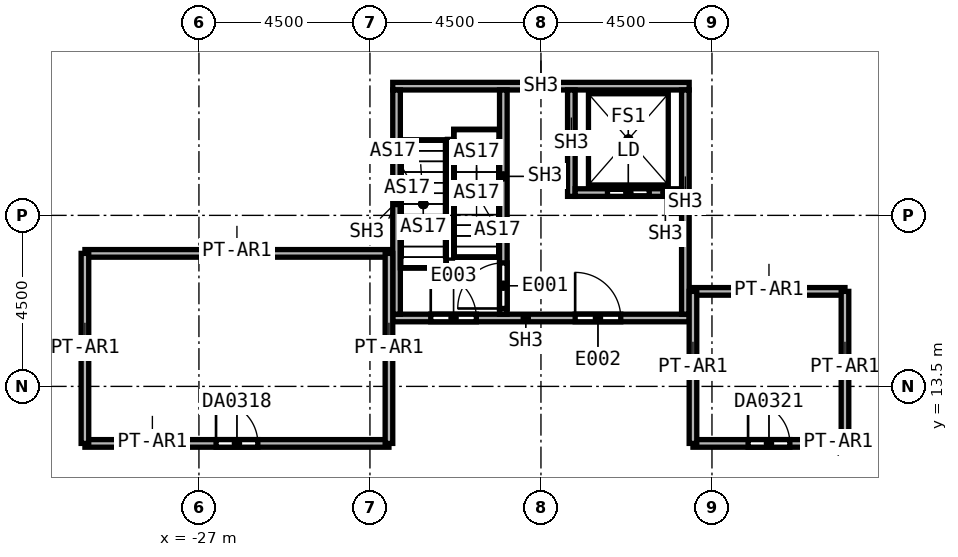
"""IFC4 building model, lengths in metres.
Left out: names, types, materials, properties, quantities, classifications, styles, units other than length and angle.
Written with IfcOpenShell. Run it as: python <this file> out.ifc"""

import sys

from ifc_helpers import new_model, si_unit, direction, frame, frame_2d, origin, place, context, subcontext, project, spatial, rectangle, extrude, element, fill, save


model = new_model("IFC4")
c1 = context("Model", 3, precision=1e-05, world=origin(), true_north=direction((0.0, 1.0)))
c2 = subcontext(c1, "Body", "Model", "MODEL_VIEW")
j1 = project(units=[si_unit("LENGTHUNIT", "METRE"), si_unit("PLANEANGLEUNIT", "RADIAN")], contexts=[c1])
p1 = place(None, origin())
s1 = spatial("IfcSite", under=j1, at=p1, CompositionType="ELEMENT")
p2 = place(p1, origin())
s2 = spatial("IfcBuilding", under=s1, at=p2, CompositionType="ELEMENT")
p3 = place(p2, origin())
s3 = spatial("IfcBuildingStorey", under=s2, at=p3, CompositionType="ELEMENT", Elevation=0.0)
p4 = place(p3, frame((-21.9, 15.3, 0.0), z_axis=(0.0, 0.0, 1.0), x_axis=(1.0, 0.0, 0.0)))
e1 = element("IfcWall", 1, at=p4, inside=s3, PredefinedType="SOLIDWALL", context=c2, shape_type="SweptSolid", body=[
    extrude(rectangle(XDim=7.8, YDim=0.2, at=frame_2d((3.9, 0.0))), origin(), (0.0, 0.0, 1.0), 11.7),
])
p5 = place(p4, frame((4.8, 0.0, 0.0)))
e2 = element("IfcOpeningElement", 2, at=p5, cuts=e1, PredefinedType="OPENING", context=c2, shape_type="SweptSolid", body=[
    extrude(rectangle(XDim=1.2, YDim=2.1, at=frame_2d((0.6, 1.05))), frame((0.0, 0.1, 0.0), z_axis=(0.0, -1.0, 0.0), x_axis=(1.0, 0.0, 0.0)), (0.0, 0.0, 1.0), 0.2),
])
p6 = place(p4, frame((1.0, 0.0, 0.0)))
e3 = element("IfcOpeningElement", 3, at=p6, cuts=e1, PredefinedType="OPENING", context=c2, shape_type="SweptSolid", body=[
    extrude(rectangle(XDim=1.2, YDim=2.1, at=frame_2d((0.6, 1.05))), frame((0.0, 0.1, 0.0), z_axis=(0.0, -1.0, 0.0), x_axis=(1.0, 0.0, 0.0)), (0.0, 0.0, 1.0), 0.2),
])
p7 = place(p3, frame((-21.9, 21.4, 0.0), z_axis=(0.0, 0.0, 1.0), x_axis=(1.0, 0.0, 0.0)))
e4 = element("IfcWall", 4, at=p7, inside=s3, PredefinedType="SOLIDWALL", context=c2, shape_type="SweptSolid", body=[
    extrude(rectangle(XDim=7.8, YDim=0.2, at=frame_2d((3.9, 0.0))), origin(), (0.0, 0.0, 1.0), 11.7),
])
for number, where, z_axis, x_axis in (
    (5, (-21.8, 15.4, 0.0), (0.0, 0.0, 1.0), (0.0, 1.0, 0.0)),
    (6, (-14.2, 15.4, 0.0), (0.0, 0.0, 1.0), (0.0, 1.0, 0.0)),
):
    element("IfcWall", number, at=place(p3, frame(where, z_axis=z_axis, x_axis=x_axis)), inside=s3, PredefinedType="SOLIDWALL", context=c2, shape_type="SweptSolid", body=[
        extrude(rectangle(XDim=5.9, YDim=0.2, at=frame_2d((2.95, 0.0))), origin(), (0.0, 0.0, 1.0), 11.7),
    ])
p8 = place(p3, frame((-18.99, 15.4, 0.0), z_axis=(0.0, 0.0, 1.0), x_axis=(0.0, 1.0, 0.0)))
e7 = element("IfcWall", 7, at=p8, inside=s3, PredefinedType="SOLIDWALL", context=c2, shape_type="SweptSolid", body=[
    extrude(rectangle(XDim=5.9, YDim=0.2, at=frame_2d((2.95, 0.0))), origin(), (0.0, 0.0, 1.0), 11.7),
])
p9 = place(p8, frame((0.15, 0.0, 0.0)))
e8 = element("IfcOpeningElement", 8, at=p9, cuts=e7, PredefinedType="OPENING", context=c2, shape_type="SweptSolid", body=[
    extrude(rectangle(XDim=1.2, YDim=2.1, at=frame_2d((0.6, 1.05))), frame((0.0, 0.1, 0.0), z_axis=(0.0, -1.0, 0.0), x_axis=(1.0, 0.0, 0.0)), (0.0, 0.0, 1.0), 0.2),
])
p10 = place(p3, frame((-17.2, 18.5, 0.0), z_axis=(0.0, 0.0, 1.0), x_axis=(0.0, 1.0, 0.0)))
e9 = element("IfcWall", 9, at=p10, inside=s3, PredefinedType="SOLIDWALL", context=c2, shape_type="SweptSolid", body=[
    extrude(rectangle(XDim=2.8, YDim=0.2, at=frame_2d((1.4, 0.0))), origin(), (0.0, 0.0, 1.0), 11.7),
])
p11 = place(p3, frame((-17.1, 18.6, 0.0), z_axis=(0.0, 0.0, 1.0), x_axis=(1.0, 0.0, 0.0)))
e10 = element("IfcWall", 10, at=p11, inside=s3, PredefinedType="SOLIDWALL", context=c2, shape_type="SweptSolid", body=[
    extrude(rectangle(XDim=2.8, YDim=0.2, at=frame_2d((1.4, 0.0))), origin(), (0.0, 0.0, 1.0), 11.7),
])
p12 = place(p11, frame((0.85, 0.0, 0.0)))
e11 = element("IfcOpeningElement", 11, at=p12, cuts=e10, PredefinedType="OPENING", context=c2, shape_type="SweptSolid", body=[
    extrude(rectangle(XDim=1.1, YDim=2.1, at=frame_2d((0.55, 1.05))), frame((0.0, 0.1, 0.0), z_axis=(0.0, -1.0, 0.0), x_axis=(1.0, 0.0, 0.0)), (0.0, 0.0, 1.0), 0.2),
])
p13 = place(p3, frame((-30.0, 12.0, 0.0), z_axis=(0.0, 0.0, 1.0), x_axis=(1.0, 0.0, 0.0)))
e12 = element("IfcWall", 12, at=p13, inside=s3, PredefinedType="PARTITIONING", context=c2, shape_type="SweptSolid", body=[
    extrude(rectangle(XDim=8.0, YDim=0.2, at=frame_2d((4.0, 0.0))), origin(), (0.0, 0.0, 1.0), 11.7),
])
p14 = place(p13, frame((3.45, 0.0, 0.0)))
e13 = element("IfcOpeningElement", 13, at=p14, cuts=e12, PredefinedType="OPENING", context=c2, shape_type="SweptSolid", body=[
    extrude(rectangle(XDim=1.1, YDim=2.4, at=frame_2d((0.55, 1.2))), frame((0.0, 0.1, 0.0), z_axis=(0.0, -1.0, 0.0), x_axis=(1.0, 0.0, 0.0)), (0.0, 0.0, 1.0), 0.2),
])
p15 = place(p3, frame((-22.0, 17.0, 0.0), z_axis=(0.0, 0.0, 1.0), x_axis=(-1.0, 0.0, 0.0)))
e14 = element("IfcWall", 14, at=p15, inside=s3, PredefinedType="PARTITIONING", context=c2, shape_type="SweptSolid", body=[
    extrude(rectangle(XDim=8.0, YDim=0.2, at=frame_2d((4.0, 0.0))), origin(), (0.0, 0.0, 1.0), 11.7),
])
for number, where, z_axis, x_axis in (
    (15, (-30.0, 17.0, 0.0), (0.0, 0.0, 1.0), (0.0, -1.0, 0.0)),
    (16, (-22.0, 12.0, 0.0), (0.0, 0.0, 1.0), (0.0, 1.0, 0.0)),
):
    element("IfcWall", number, at=place(p3, frame(where, z_axis=z_axis, x_axis=x_axis)), inside=s3, PredefinedType="PARTITIONING", context=c2, shape_type="SweptSolid", body=[
        extrude(rectangle(XDim=5.0, YDim=0.2, at=frame_2d((2.5, 0.0))), origin(), (0.0, 0.0, 1.0), 11.7),
    ])
p16 = place(p3, frame((-14.0, 12.0, 0.0), z_axis=(0.0, 0.0, 1.0), x_axis=(1.0, 0.0, 0.0)))
e17 = element("IfcWall", 17, at=p16, inside=s3, PredefinedType="PARTITIONING", context=c2, shape_type="SweptSolid", body=[
    extrude(rectangle(XDim=4.0, YDim=0.2, at=frame_2d((2.0, 0.0))), origin(), (0.0, 0.0, 1.0), 11.7),
])
p17 = place(p16, frame((1.45, 0.0, 0.0)))
e18 = element("IfcOpeningElement", 18, at=p17, cuts=e17, PredefinedType="OPENING", context=c2, shape_type="SweptSolid", body=[
    extrude(rectangle(XDim=1.1, YDim=2.4, at=frame_2d((0.55, 1.2))), frame((0.0, 0.1, 0.0), z_axis=(0.0, -1.0, 0.0), x_axis=(1.0, 0.0, 0.0)), (0.0, 0.0, 1.0), 0.2),
])
for number, where, z_axis, x_axis in (
    (19, (-10.0, 16.0, 0.0), (0.0, 0.0, 1.0), (-1.0, 0.0, 0.0)),
    (20, (-14.0, 16.0, 0.0), (0.0, 0.0, 1.0), (0.0, -1.0, 0.0)),
    (21, (-10.0, 12.0, 0.0), (0.0, 0.0, 1.0), (0.0, 1.0, 0.0)),
):
    element("IfcWall", number, at=place(p3, frame(where, z_axis=z_axis, x_axis=x_axis)), inside=s3, PredefinedType="PARTITIONING", context=c2, shape_type="SweptSolid", body=[
        extrude(rectangle(XDim=4.0, YDim=0.2, at=frame_2d((2.0, 0.0))), origin(), (0.0, 0.0, 1.0), 11.7),
    ])
p18 = place(p9, origin())
e22 = element("IfcDoor", 22, at=p18, inside=s3, OperationType="SINGLE_SWING_LEFT", PredefinedType="DOOR", context=c2, shape_type="SweptSolid", body=[
    extrude(rectangle(XDim=1.2, YDim=2.1, at=frame_2d((0.6, 1.05))), frame((0.0, 0.025, 0.0), z_axis=(0.0, -1.0, 0.0), x_axis=(1.0, 0.0, 0.0)), (0.0, 0.0, 1.0), 0.05),
])
fill(e8, e22)
p19 = place(p12, origin())
e23 = element("IfcDoor", 23, at=p19, inside=s3, OperationType="SLIDING_TO_LEFT", PredefinedType="DOOR", context=c2, shape_type="SweptSolid", body=[
    extrude(rectangle(XDim=1.1, YDim=2.1, at=frame_2d((0.55, 1.05))), frame((0.0, 0.025, 0.0), z_axis=(0.0, -1.0, 0.0), x_axis=(1.0, 0.0, 0.0)), (0.0, 0.0, 1.0), 0.05),
])
fill(e11, e23)
p20 = place(p5, origin())
e24 = element("IfcDoor", 24, at=p20, inside=s3, OperationType="SINGLE_SWING_RIGHT", PredefinedType="DOOR", context=c2, shape_type="SweptSolid", body=[
    extrude(rectangle(XDim=1.2, YDim=2.1, at=frame_2d((0.6, 1.05))), frame((0.0, 0.025, 0.0), z_axis=(0.0, -1.0, 0.0), x_axis=(1.0, 0.0, 0.0)), (0.0, 0.0, 1.0), 0.05),
])
fill(e2, e24)
p21 = place(p6, frame((1.2, 0.0, 0.0), z_axis=(0.0, 0.0, 1.0), x_axis=(-1.0, 0.0, 0.0)))
e25 = element("IfcDoor", 25, at=p21, inside=s3, OperationType="SINGLE_SWING_LEFT", PredefinedType="DOOR", context=c2, shape_type="SweptSolid", body=[
    extrude(rectangle(XDim=1.2, YDim=2.1, at=frame_2d((0.6, 1.05))), frame((0.0, 0.025, 0.0), z_axis=(0.0, -1.0, 0.0), x_axis=(1.0, 0.0, 0.0)), (0.0, 0.0, 1.0), 0.05),
])
fill(e3, e25)
p22 = place(p14, origin())
e26 = element("IfcDoor", 26, at=p22, inside=s3, OperationType="DOUBLE_DOOR_SINGLE_SWING", PredefinedType="DOOR", context=c2, shape_type="SweptSolid", body=[
    extrude(rectangle(XDim=1.1, YDim=2.4, at=frame_2d((0.55, 1.2))), frame((0.0, 0.025, 0.0), z_axis=(0.0, -1.0, 0.0), x_axis=(1.0, 0.0, 0.0)), (0.0, 0.0, 1.0), 0.05),
])
fill(e13, e26)
p23 = place(p17, origin())
e27 = element("IfcDoor", 27, at=p23, inside=s3, OperationType="DOUBLE_DOOR_SINGLE_SWING", PredefinedType="DOOR", context=c2, shape_type="SweptSolid", body=[
    extrude(rectangle(XDim=1.1, YDim=2.4, at=frame_2d((0.55, 1.2))), frame((0.0, 0.025, 0.0), z_axis=(0.0, -1.0, 0.0), x_axis=(1.0, 0.0, 0.0)), (0.0, 0.0, 1.0), 0.05),
])
fill(e18, e27)
save(model, sys.argv[1])
